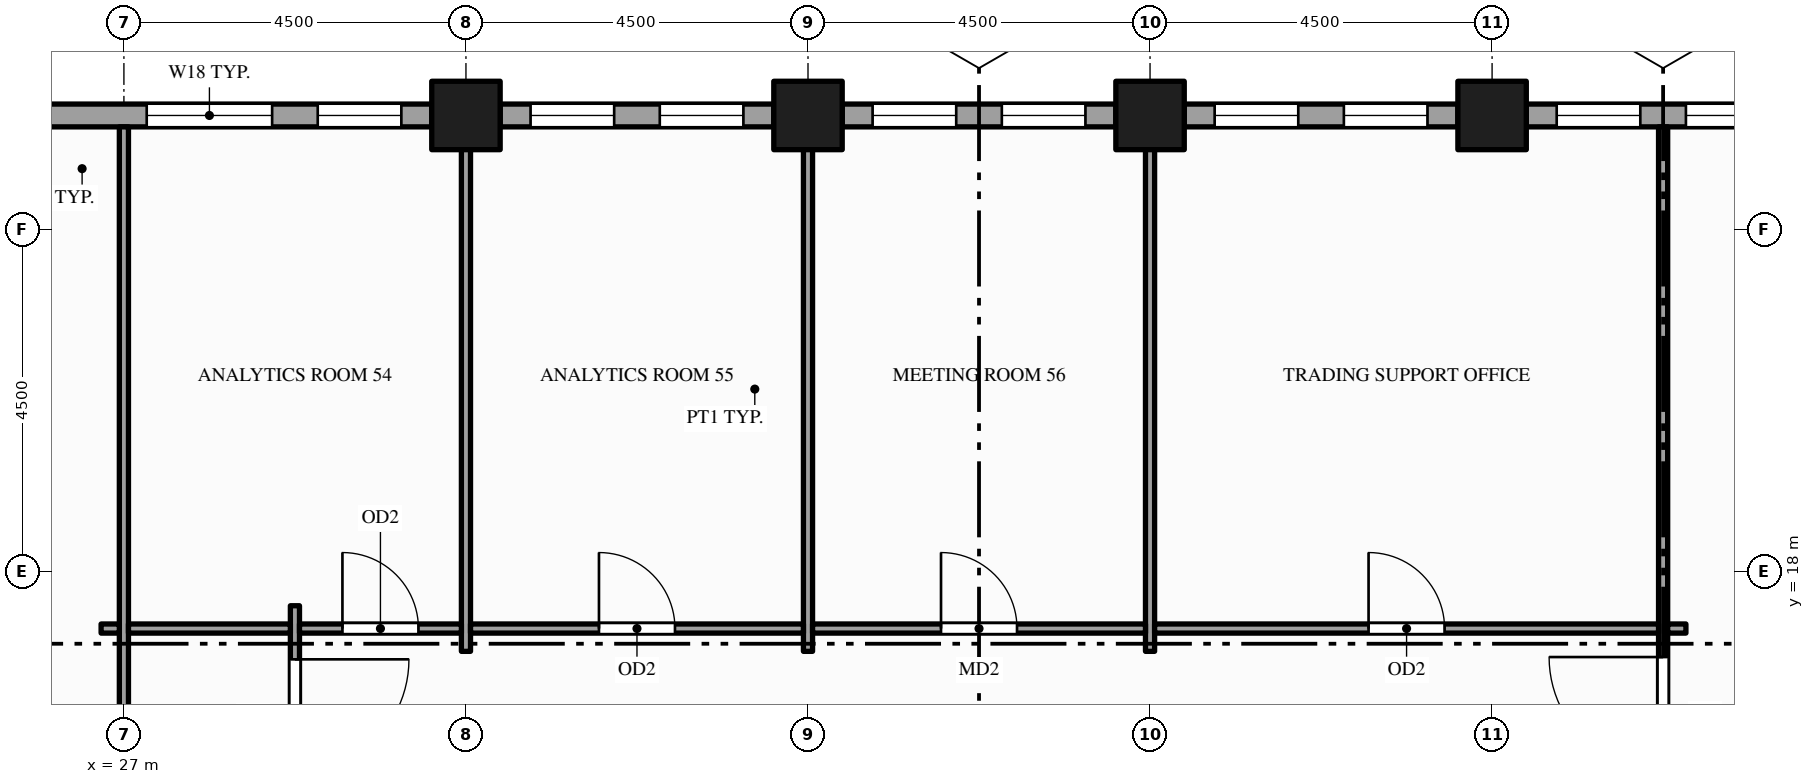
"""IFC4 building model, lengths in metres.
Left out: names, types, materials, properties, quantities, classifications, styles, units other than length and angle.
Written with IfcOpenShell. Run it as: python <this file> out.ifc"""

import sys

from ifc_helpers import new_model, si_unit, direction, frame, frame_2d, origin, origin_2d, place, context, subcontext, project, spatial, rectangle, hollow_rectangle, extrude, element, fill, save


model = new_model("IFC4")
c1 = context("Model", 3, precision=1e-05, world=origin(), true_north=direction((0.0, 1.0)))
c2 = subcontext(c1, "Body", "Model", "MODEL_VIEW")
j1 = project(units=[si_unit("LENGTHUNIT", "METRE"), si_unit("PLANEANGLEUNIT", "RADIAN")], contexts=[c1])
p1 = place(None, origin())
s1 = spatial("IfcSite", under=j1, at=p1, CompositionType="ELEMENT")
p2 = place(p1, origin())
s2 = spatial("IfcBuilding", under=s1, at=p2, CompositionType="ELEMENT")
p3 = place(p2, frame((0.0, 0.0, 171.0)))
s3 = spatial("IfcBuildingStorey", under=s2, at=p3, CompositionType="ELEMENT", Elevation=171.0)
for number, where, z_axis, x_axis in (
    (1, (31.5, 24.0, -0.15), (0.0, 0.0, 1.0), (1.0, 0.0, 0.0)),
    (2, (36.0, 24.0, -0.15), (0.0, 0.0, 1.0), (1.0, 0.0, 0.0)),
    (3, (40.5, 24.0, -0.15), (0.0, 0.0, 1.0), (1.0, 0.0, 0.0)),
    (4, (45.0, 24.0, -0.15), (0.0, 0.0, 1.0), (1.0, 0.0, 0.0)),
):
    element("IfcColumn", number, at=place(p3, frame(where, z_axis=z_axis, x_axis=x_axis)), inside=s3, PredefinedType="COLUMN", context=c2, shape_type="SweptSolid", body=[
        extrude(hollow_rectangle(XDim=0.9, YDim=0.9, WallThickness=0.045, at=origin_2d()), origin(), (0.0, 0.0, 1.0), 4.0),
    ])
p4 = place(p3, frame((49.05, 24.0, 0.0), z_axis=(0.0, 0.0, 1.0), x_axis=(-1.0, 0.0, 0.0)))
e5 = element("IfcWall", 5, at=p4, inside=s3, PredefinedType="STANDARD", context=c2, shape_type="SweptSolid", body=[
    extrude(rectangle(XDim=3.6, YDim=0.3, at=frame_2d((1.8, 0.0))), origin(), (0.0, 0.0, 1.0), 2.87),
])
p5 = place(p4, frame((0.4, 0.0, 0.9)))
e6 = element("IfcOpeningElement", 6, at=p5, cuts=e5, PredefinedType="OPENING", context=c2, shape_type="SweptSolid", body=[
    extrude(rectangle(XDim=1.1, YDim=1.75, at=frame_2d((0.55, 0.875))), frame((0.0, 0.16, 0.0), z_axis=(0.0, -1.0, 0.0), x_axis=(1.0, 0.0, 0.0)), (0.0, 0.0, 1.0), 0.32),
])
p6 = place(p4, frame((2.1, 0.0, 0.9)))
e7 = element("IfcOpeningElement", 7, at=p6, cuts=e5, PredefinedType="OPENING", context=c2, shape_type="SweptSolid", body=[
    extrude(rectangle(XDim=1.1, YDim=1.75, at=frame_2d((0.55, 0.875))), frame((0.0, 0.16, 0.0), z_axis=(0.0, -1.0, 0.0), x_axis=(1.0, 0.0, 0.0)), (0.0, 0.0, 1.0), 0.32),
])
p7 = place(p3, frame((44.55, 24.0, 0.0), z_axis=(0.0, 0.0, 1.0), x_axis=(-1.0, 0.0, 0.0)))
e8 = element("IfcWall", 8, at=p7, inside=s3, PredefinedType="STANDARD", context=c2, shape_type="SweptSolid", body=[
    extrude(rectangle(XDim=3.6, YDim=0.3, at=frame_2d((1.8, 0.0))), origin(), (0.0, 0.0, 1.0), 2.87),
])
p8 = place(p7, frame((0.4, 0.0, 0.9)))
e9 = element("IfcOpeningElement", 9, at=p8, cuts=e8, PredefinedType="OPENING", context=c2, shape_type="SweptSolid", body=[
    extrude(rectangle(XDim=1.1, YDim=1.75, at=frame_2d((0.55, 0.875))), frame((0.0, 0.16, 0.0), z_axis=(0.0, -1.0, 0.0), x_axis=(1.0, 0.0, 0.0)), (0.0, 0.0, 1.0), 0.32),
])
p9 = place(p7, frame((2.1, 0.0, 0.9)))
e10 = element("IfcOpeningElement", 10, at=p9, cuts=e8, PredefinedType="OPENING", context=c2, shape_type="SweptSolid", body=[
    extrude(rectangle(XDim=1.1, YDim=1.75, at=frame_2d((0.55, 0.875))), frame((0.0, 0.16, 0.0), z_axis=(0.0, -1.0, 0.0), x_axis=(1.0, 0.0, 0.0)), (0.0, 0.0, 1.0), 0.32),
])
p10 = place(p3, frame((40.05, 24.0, 0.0), z_axis=(0.0, 0.0, 1.0), x_axis=(-1.0, 0.0, 0.0)))
e11 = element("IfcWall", 11, at=p10, inside=s3, PredefinedType="STANDARD", context=c2, shape_type="SweptSolid", body=[
    extrude(rectangle(XDim=3.6, YDim=0.3, at=frame_2d((1.8, 0.0))), origin(), (0.0, 0.0, 1.0), 2.87),
])
p11 = place(p10, frame((0.4, 0.0, 0.9)))
e12 = element("IfcOpeningElement", 12, at=p11, cuts=e11, PredefinedType="OPENING", context=c2, shape_type="SweptSolid", body=[
    extrude(rectangle(XDim=1.1, YDim=1.75, at=frame_2d((0.55, 0.875))), frame((0.0, 0.16, 0.0), z_axis=(0.0, -1.0, 0.0), x_axis=(1.0, 0.0, 0.0)), (0.0, 0.0, 1.0), 0.32),
])
p12 = place(p10, frame((2.1, 0.0, 0.9)))
e13 = element("IfcOpeningElement", 13, at=p12, cuts=e11, PredefinedType="OPENING", context=c2, shape_type="SweptSolid", body=[
    extrude(rectangle(XDim=1.1, YDim=1.75, at=frame_2d((0.55, 0.875))), frame((0.0, 0.16, 0.0), z_axis=(0.0, -1.0, 0.0), x_axis=(1.0, 0.0, 0.0)), (0.0, 0.0, 1.0), 0.32),
])
p13 = place(p3, frame((35.55, 24.0, 0.0), z_axis=(0.0, 0.0, 1.0), x_axis=(-1.0, 0.0, 0.0)))
e14 = element("IfcWall", 14, at=p13, inside=s3, PredefinedType="STANDARD", context=c2, shape_type="SweptSolid", body=[
    extrude(rectangle(XDim=3.6, YDim=0.3, at=frame_2d((1.8, 0.0))), origin(), (0.0, 0.0, 1.0), 2.87),
])
p14 = place(p13, frame((0.4, 0.0, 0.9)))
e15 = element("IfcOpeningElement", 15, at=p14, cuts=e14, PredefinedType="OPENING", context=c2, shape_type="SweptSolid", body=[
    extrude(rectangle(XDim=1.1, YDim=1.75, at=frame_2d((0.55, 0.875))), frame((0.0, 0.16, 0.0), z_axis=(0.0, -1.0, 0.0), x_axis=(1.0, 0.0, 0.0)), (0.0, 0.0, 1.0), 0.32),
])
p15 = place(p13, frame((2.1, 0.0, 0.9)))
e16 = element("IfcOpeningElement", 16, at=p15, cuts=e14, PredefinedType="OPENING", context=c2, shape_type="SweptSolid", body=[
    extrude(rectangle(XDim=1.1, YDim=1.75, at=frame_2d((0.55, 0.875))), frame((0.0, 0.16, 0.0), z_axis=(0.0, -1.0, 0.0), x_axis=(1.0, 0.0, 0.0)), (0.0, 0.0, 1.0), 0.32),
])
p16 = place(p3, frame((31.05, 24.0, 0.0), z_axis=(0.0, 0.0, 1.0), x_axis=(-1.0, 0.0, 0.0)))
e17 = element("IfcWall", 17, at=p16, inside=s3, PredefinedType="STANDARD", context=c2, shape_type="SweptSolid", body=[
    extrude(rectangle(XDim=5.1, YDim=0.3, at=frame_2d((2.55, 0.0))), origin(), (0.0, 0.0, 1.0), 2.87),
])
p17 = place(p16, frame((0.4, 0.0, 0.9)))
e18 = element("IfcOpeningElement", 18, at=p17, cuts=e17, PredefinedType="OPENING", context=c2, shape_type="SweptSolid", body=[
    extrude(rectangle(XDim=1.1, YDim=1.75, at=frame_2d((0.55, 0.875))), frame((0.0, 0.16, 0.0), z_axis=(0.0, -1.0, 0.0), x_axis=(1.0, 0.0, 0.0)), (0.0, 0.0, 1.0), 0.32),
])
p18 = place(p16, frame((2.1, 0.0, 0.9)))
e19 = element("IfcOpeningElement", 19, at=p18, cuts=e17, PredefinedType="OPENING", context=c2, shape_type="SweptSolid", body=[
    extrude(rectangle(XDim=1.65, YDim=1.75, at=frame_2d((0.825, 0.875))), frame((0.0, 0.16, 0.0), z_axis=(0.0, -1.0, 0.0), x_axis=(1.0, 0.0, 0.0)), (0.0, 0.0, 1.0), 0.32),
])
p19 = place(p3, frame((27.0, 1.65, 0.0), z_axis=(0.0, 0.0, 1.0), x_axis=(0.0, 1.0, 0.0)))
e20 = element("IfcWall", 20, at=p19, inside=s3, PredefinedType="PARTITIONING", context=c2, shape_type="SweptSolid", body=[
    extrude(rectangle(XDim=22.2, YDim=0.12, at=frame_2d((11.1, 0.0))), origin(), (0.0, 0.0, 1.0), 2.87),
])
p20 = place(p19, frame((9.975, 0.0, 0.0)))
e21 = element("IfcOpeningElement", 21, at=p20, cuts=e20, PredefinedType="OPENING", context=c2, shape_type="SweptSolid", body=[
    extrude(rectangle(XDim=1.5, YDim=2.1, at=frame_2d((0.75, 1.05))), frame((0.0, 0.07, 0.0), z_axis=(0.0, -1.0, 0.0), x_axis=(1.0, 0.0, 0.0)), (0.0, 0.0, 1.0), 0.14),
])
p21 = place(p19, frame((13.125, 0.0, 0.0)))
e22 = element("IfcOpeningElement", 22, at=p21, cuts=e20, PredefinedType="OPENING", context=c2, shape_type="SweptSolid", body=[
    extrude(rectangle(XDim=1.2, YDim=2.1, at=frame_2d((0.6, 1.05))), frame((0.0, 0.07, 0.0), z_axis=(0.0, -1.0, 0.0), x_axis=(1.0, 0.0, 0.0)), (0.0, 0.0, 1.0), 0.14),
])
p22 = place(p3, frame((29.25, 7.95, 0.0), z_axis=(0.0, 0.0, 1.0), x_axis=(0.0, 1.0, 0.0)))
e23 = element("IfcWall", 23, at=p22, inside=s3, PredefinedType="PARTITIONING", context=c2, shape_type="SweptSolid", body=[
    extrude(rectangle(XDim=9.6, YDim=0.12, at=frame_2d((4.8, 0.0))), origin(), (0.0, 0.0, 1.0), 2.87),
])
p23 = place(p22, frame((0.705, 0.0, 0.0)))
e24 = element("IfcOpeningElement", 24, at=p23, cuts=e23, PredefinedType="OPENING", context=c2, shape_type="SweptSolid", body=[
    extrude(rectangle(XDim=1.5, YDim=2.1, at=frame_2d((0.75, 1.05))), frame((0.0, 0.07, 0.0), z_axis=(0.0, -1.0, 0.0), x_axis=(1.0, 0.0, 0.0)), (0.0, 0.0, 1.0), 0.14),
])
p24 = place(p22, frame((7.395, 0.0, 0.0)))
e25 = element("IfcOpeningElement", 25, at=p24, cuts=e23, PredefinedType="OPENING", context=c2, shape_type="SweptSolid", body=[
    extrude(rectangle(XDim=1.5, YDim=2.1, at=frame_2d((0.75, 1.05))), frame((0.0, 0.07, 0.0), z_axis=(0.0, -1.0, 0.0), x_axis=(1.0, 0.0, 0.0)), (0.0, 0.0, 1.0), 0.14),
])
for number, where, z_axis, x_axis in (
    (26, (31.5, 16.95, 0.0), (0.0, 0.0, 1.0), (0.0, 1.0, 0.0)),
    (27, (36.0, 16.95, 0.0), (0.0, 0.0, 1.0), (0.0, 1.0, 0.0)),
    (28, (40.5, 16.95, 0.0), (0.0, 0.0, 1.0), (0.0, 1.0, 0.0)),
):
    element("IfcWall", number, at=place(p3, frame(where, z_axis=z_axis, x_axis=x_axis)), inside=s3, PredefinedType="PARTITIONING", context=c2, shape_type="SweptSolid", body=[
        extrude(rectangle(XDim=6.9, YDim=0.12, at=frame_2d((3.45, 0.0))), origin(), (0.0, 0.0, 1.0), 2.87),
    ])
p25 = place(p3, frame((47.25, 1.65, 0.0), z_axis=(0.0, 0.0, 1.0), x_axis=(0.0, 1.0, 0.0)))
e29 = element("IfcWall", 29, at=p25, inside=s3, PredefinedType="PARTITIONING", context=c2, shape_type="SweptSolid", body=[
    extrude(rectangle(XDim=22.2, YDim=0.12, at=frame_2d((11.1, 0.0))), origin(), (0.0, 0.0, 1.0), 2.87),
])
p26 = place(p25, frame((6.975, 0.0, 0.0)))
e30 = element("IfcOpeningElement", 30, at=p26, cuts=e29, PredefinedType="OPENING", context=c2, shape_type="SweptSolid", body=[
    extrude(rectangle(XDim=1.5, YDim=2.1, at=frame_2d((0.75, 1.05))), frame((0.0, 0.07, 0.0), z_axis=(0.0, -1.0, 0.0), x_axis=(1.0, 0.0, 0.0)), (0.0, 0.0, 1.0), 0.14),
])
p27 = place(p25, frame((13.725, 0.0, 0.0)))
e31 = element("IfcOpeningElement", 31, at=p27, cuts=e29, PredefinedType="OPENING", context=c2, shape_type="SweptSolid", body=[
    extrude(rectangle(XDim=1.5, YDim=2.1, at=frame_2d((0.75, 1.05))), frame((0.0, 0.07, 0.0), z_axis=(0.0, -1.0, 0.0), x_axis=(1.0, 0.0, 0.0)), (0.0, 0.0, 1.0), 0.14),
])
p28 = place(p25, frame((9.29, 0.0, 0.0)))
e32 = element("IfcOpeningElement", 32, at=p28, cuts=e29, PredefinedType="OPENING", context=c2, shape_type="SweptSolid", body=[
    extrude(rectangle(XDim=0.9, YDim=2.1, at=frame_2d((0.45, 1.05))), frame((0.0, 0.07, 0.0), z_axis=(0.0, -1.0, 0.0), x_axis=(1.0, 0.0, 0.0)), (0.0, 0.0, 1.0), 0.14),
])
p29 = place(p25, frame((10.65, 0.0, 0.0)))
e33 = element("IfcOpeningElement", 33, at=p29, cuts=e29, PredefinedType="OPENING", context=c2, shape_type="SweptSolid", body=[
    extrude(rectangle(XDim=0.9, YDim=2.1, at=frame_2d((0.45, 1.05))), frame((0.0, 0.07, 0.0), z_axis=(0.0, -1.0, 0.0), x_axis=(1.0, 0.0, 0.0)), (0.0, 0.0, 1.0), 0.14),
])
p30 = place(p25, frame((12.01, 0.0, 0.0)))
e34 = element("IfcOpeningElement", 34, at=p30, cuts=e29, PredefinedType="OPENING", context=c2, shape_type="SweptSolid", body=[
    extrude(rectangle(XDim=1.0, YDim=2.1, at=frame_2d((0.5, 1.05))), frame((0.0, 0.07, 0.0), z_axis=(0.0, -1.0, 0.0), x_axis=(1.0, 0.0, 0.0)), (0.0, 0.0, 1.0), 0.14),
])
p31 = place(p3, frame((26.7, 17.25, 0.0), z_axis=(0.0, 0.0, 1.0), x_axis=(1.0, 0.0, 0.0)))
e35 = element("IfcWall", 35, at=p31, inside=s3, PredefinedType="PARTITIONING", context=c2, shape_type="SweptSolid", body=[
    extrude(rectangle(XDim=0.24, YDim=0.12, at=frame_2d((0.12, 0.0))), origin(), (0.0, 0.0, 1.0), 2.87),
])
p32 = place(p3, frame((27.06, 17.25, 0.0), z_axis=(0.0, 0.0, 1.0), x_axis=(1.0, 0.0, 0.0)))
e36 = element("IfcWall", 36, at=p32, inside=s3, PredefinedType="PARTITIONING", context=c2, shape_type="SweptSolid", body=[
    extrude(rectangle(XDim=2.13, YDim=0.12, at=frame_2d((1.065, 0.0))), origin(), (0.0, 0.0, 1.0), 2.87),
])
p33 = place(p3, frame((29.31, 17.25, 0.0), z_axis=(0.0, 0.0, 1.0), x_axis=(1.0, 0.0, 0.0)))
e37 = element("IfcWall", 37, at=p33, inside=s3, PredefinedType="PARTITIONING", context=c2, shape_type="SweptSolid", body=[
    extrude(rectangle(XDim=2.13, YDim=0.12, at=frame_2d((1.065, 0.0))), origin(), (0.0, 0.0, 1.0), 2.87),
])
p34 = place(p33, frame((0.565, 0.0, 0.0)))
e38 = element("IfcOpeningElement", 38, at=p34, cuts=e37, PredefinedType="OPENING", context=c2, shape_type="SweptSolid", body=[
    extrude(rectangle(XDim=1.0, YDim=2.1, at=frame_2d((0.5, 1.05))), frame((0.0, 0.07, 0.0), z_axis=(0.0, -1.0, 0.0), x_axis=(1.0, 0.0, 0.0)), (0.0, 0.0, 1.0), 0.14),
])
p35 = place(p3, frame((31.56, 17.25, 0.0), z_axis=(0.0, 0.0, 1.0), x_axis=(1.0, 0.0, 0.0)))
e39 = element("IfcWall", 39, at=p35, inside=s3, PredefinedType="PARTITIONING", context=c2, shape_type="SweptSolid", body=[
    extrude(rectangle(XDim=4.38, YDim=0.12, at=frame_2d((2.19, 0.0))), origin(), (0.0, 0.0, 1.0), 2.87),
])
p36 = place(p35, frame((1.69, 0.0, 0.0)))
e40 = element("IfcOpeningElement", 40, at=p36, cuts=e39, PredefinedType="OPENING", context=c2, shape_type="SweptSolid", body=[
    extrude(rectangle(XDim=1.0, YDim=2.1, at=frame_2d((0.5, 1.05))), frame((0.0, 0.07, 0.0), z_axis=(0.0, -1.0, 0.0), x_axis=(1.0, 0.0, 0.0)), (0.0, 0.0, 1.0), 0.14),
])
p37 = place(p3, frame((36.06, 17.25, 0.0), z_axis=(0.0, 0.0, 1.0), x_axis=(1.0, 0.0, 0.0)))
e41 = element("IfcWall", 41, at=p37, inside=s3, PredefinedType="PARTITIONING", context=c2, shape_type="SweptSolid", body=[
    extrude(rectangle(XDim=4.38, YDim=0.12, at=frame_2d((2.19, 0.0))), origin(), (0.0, 0.0, 1.0), 2.87),
])
p38 = place(p37, frame((1.69, 0.0, 0.0)))
e42 = element("IfcOpeningElement", 42, at=p38, cuts=e41, PredefinedType="OPENING", context=c2, shape_type="SweptSolid", body=[
    extrude(rectangle(XDim=1.0, YDim=2.1, at=frame_2d((0.5, 1.05))), frame((0.0, 0.07, 0.0), z_axis=(0.0, -1.0, 0.0), x_axis=(1.0, 0.0, 0.0)), (0.0, 0.0, 1.0), 0.14),
])
p39 = place(p3, frame((40.56, 17.25, 0.0), z_axis=(0.0, 0.0, 1.0), x_axis=(1.0, 0.0, 0.0)))
e43 = element("IfcWall", 43, at=p39, inside=s3, PredefinedType="PARTITIONING", context=c2, shape_type="SweptSolid", body=[
    extrude(rectangle(XDim=6.63, YDim=0.12, at=frame_2d((3.315, 0.0))), origin(), (0.0, 0.0, 1.0), 2.87),
])
p40 = place(p39, frame((2.815, 0.0, 0.0)))
e44 = element("IfcOpeningElement", 44, at=p40, cuts=e43, PredefinedType="OPENING", context=c2, shape_type="SweptSolid", body=[
    extrude(rectangle(XDim=1.0, YDim=2.1, at=frame_2d((0.5, 1.05))), frame((0.0, 0.07, 0.0), z_axis=(0.0, -1.0, 0.0), x_axis=(1.0, 0.0, 0.0)), (0.0, 0.0, 1.0), 0.14),
])
p41 = place(p3, frame((47.31, 17.25, 0.0), z_axis=(0.0, 0.0, 1.0), x_axis=(1.0, 0.0, 0.0)))
e45 = element("IfcWall", 45, at=p41, inside=s3, PredefinedType="PARTITIONING", context=c2, shape_type="SweptSolid", body=[
    extrude(rectangle(XDim=0.24, YDim=0.12, at=frame_2d((0.12, 0.0))), origin(), (0.0, 0.0, 1.0), 2.87),
])
p42 = place(p5, origin())
e46 = element("IfcWindow", 46, at=p42, inside=s3, PartitioningType="SINGLE_PANEL", PredefinedType="WINDOW", context=c2, shape_type="SweptSolid", body=[
    extrude(rectangle(XDim=1.1, YDim=1.75, at=frame_2d((0.55, 0.875))), frame((0.0, 0.03, 0.0), z_axis=(0.0, -1.0, 0.0), x_axis=(1.0, 0.0, 0.0)), (0.0, 0.0, 1.0), 0.06),
])
fill(e6, e46)
p43 = place(p6, origin())
e47 = element("IfcWindow", 47, at=p43, inside=s3, PartitioningType="SINGLE_PANEL", PredefinedType="WINDOW", context=c2, shape_type="SweptSolid", body=[
    extrude(rectangle(XDim=1.1, YDim=1.75, at=frame_2d((0.55, 0.875))), frame((0.0, 0.03, 0.0), z_axis=(0.0, -1.0, 0.0), x_axis=(1.0, 0.0, 0.0)), (0.0, 0.0, 1.0), 0.06),
])
fill(e7, e47)
p44 = place(p8, origin())
e48 = element("IfcWindow", 48, at=p44, inside=s3, PartitioningType="SINGLE_PANEL", PredefinedType="WINDOW", context=c2, shape_type="SweptSolid", body=[
    extrude(rectangle(XDim=1.1, YDim=1.75, at=frame_2d((0.55, 0.875))), frame((0.0, 0.03, 0.0), z_axis=(0.0, -1.0, 0.0), x_axis=(1.0, 0.0, 0.0)), (0.0, 0.0, 1.0), 0.06),
])
fill(e9, e48)
p45 = place(p9, origin())
e49 = element("IfcWindow", 49, at=p45, inside=s3, PartitioningType="SINGLE_PANEL", PredefinedType="WINDOW", context=c2, shape_type="SweptSolid", body=[
    extrude(rectangle(XDim=1.1, YDim=1.75, at=frame_2d((0.55, 0.875))), frame((0.0, 0.03, 0.0), z_axis=(0.0, -1.0, 0.0), x_axis=(1.0, 0.0, 0.0)), (0.0, 0.0, 1.0), 0.06),
])
fill(e10, e49)
p46 = place(p11, origin())
e50 = element("IfcWindow", 50, at=p46, inside=s3, PartitioningType="SINGLE_PANEL", PredefinedType="WINDOW", context=c2, shape_type="SweptSolid", body=[
    extrude(rectangle(XDim=1.1, YDim=1.75, at=frame_2d((0.55, 0.875))), frame((0.0, 0.03, 0.0), z_axis=(0.0, -1.0, 0.0), x_axis=(1.0, 0.0, 0.0)), (0.0, 0.0, 1.0), 0.06),
])
fill(e12, e50)
p47 = place(p12, origin())
e51 = element("IfcWindow", 51, at=p47, inside=s3, PartitioningType="SINGLE_PANEL", PredefinedType="WINDOW", context=c2, shape_type="SweptSolid", body=[
    extrude(rectangle(XDim=1.1, YDim=1.75, at=frame_2d((0.55, 0.875))), frame((0.0, 0.03, 0.0), z_axis=(0.0, -1.0, 0.0), x_axis=(1.0, 0.0, 0.0)), (0.0, 0.0, 1.0), 0.06),
])
fill(e13, e51)
p48 = place(p14, origin())
e52 = element("IfcWindow", 52, at=p48, inside=s3, PartitioningType="SINGLE_PANEL", PredefinedType="WINDOW", context=c2, shape_type="SweptSolid", body=[
    extrude(rectangle(XDim=1.1, YDim=1.75, at=frame_2d((0.55, 0.875))), frame((0.0, 0.03, 0.0), z_axis=(0.0, -1.0, 0.0), x_axis=(1.0, 0.0, 0.0)), (0.0, 0.0, 1.0), 0.06),
])
fill(e15, e52)
p49 = place(p15, origin())
e53 = element("IfcWindow", 53, at=p49, inside=s3, PartitioningType="SINGLE_PANEL", PredefinedType="WINDOW", context=c2, shape_type="SweptSolid", body=[
    extrude(rectangle(XDim=1.1, YDim=1.75, at=frame_2d((0.55, 0.875))), frame((0.0, 0.03, 0.0), z_axis=(0.0, -1.0, 0.0), x_axis=(1.0, 0.0, 0.0)), (0.0, 0.0, 1.0), 0.06),
])
fill(e16, e53)
p50 = place(p17, origin())
e54 = element("IfcWindow", 54, at=p50, inside=s3, PartitioningType="SINGLE_PANEL", PredefinedType="WINDOW", context=c2, shape_type="SweptSolid", body=[
    extrude(rectangle(XDim=1.1, YDim=1.75, at=frame_2d((0.55, 0.875))), frame((0.0, 0.03, 0.0), z_axis=(0.0, -1.0, 0.0), x_axis=(1.0, 0.0, 0.0)), (0.0, 0.0, 1.0), 0.06),
])
fill(e18, e54)
p51 = place(p18, origin())
e55 = element("IfcWindow", 55, at=p51, inside=s3, PartitioningType="SINGLE_PANEL", PredefinedType="WINDOW", context=c2, shape_type="SweptSolid", body=[
    extrude(rectangle(XDim=1.65, YDim=1.75, at=frame_2d((0.825, 0.875))), frame((0.0, 0.03, 0.0), z_axis=(0.0, -1.0, 0.0), x_axis=(1.0, 0.0, 0.0)), (0.0, 0.0, 1.0), 0.06),
])
fill(e19, e55)
p52 = place(p24, origin())
e56 = element("IfcDoor", 56, at=p52, inside=s3, OperationType="SINGLE_SWING_RIGHT", PredefinedType="DOOR", context=c2, shape_type="SweptSolid", body=[
    extrude(rectangle(XDim=1.5, YDim=2.1, at=frame_2d((0.75, 1.05))), frame((0.0, 0.025, 0.0), z_axis=(0.0, -1.0, 0.0), x_axis=(1.0, 0.0, 0.0)), (0.0, 0.0, 1.0), 0.05),
])
fill(e25, e56)
p53 = place(p27, origin())
e57 = element("IfcDoor", 57, at=p53, inside=s3, OperationType="SINGLE_SWING_RIGHT", PredefinedType="DOOR", context=c2, shape_type="SweptSolid", body=[
    extrude(rectangle(XDim=1.5, YDim=2.1, at=frame_2d((0.75, 1.05))), frame((0.0, 0.025, 0.0), z_axis=(0.0, -1.0, 0.0), x_axis=(1.0, 0.0, 0.0)), (0.0, 0.0, 1.0), 0.05),
])
fill(e31, e57)
p54 = place(p34, origin())
e58 = element("IfcDoor", 58, at=p54, inside=s3, OperationType="SINGLE_SWING_LEFT", PredefinedType="DOOR", context=c2, shape_type="SweptSolid", body=[
    extrude(rectangle(XDim=1.0, YDim=2.1, at=frame_2d((0.5, 1.05))), frame((0.0, 0.025, 0.0), z_axis=(0.0, -1.0, 0.0), x_axis=(1.0, 0.0, 0.0)), (0.0, 0.0, 1.0), 0.05),
])
fill(e38, e58)
p55 = place(p36, origin())
e59 = element("IfcDoor", 59, at=p55, inside=s3, OperationType="SINGLE_SWING_LEFT", PredefinedType="DOOR", context=c2, shape_type="SweptSolid", body=[
    extrude(rectangle(XDim=1.0, YDim=2.1, at=frame_2d((0.5, 1.05))), frame((0.0, 0.025, 0.0), z_axis=(0.0, -1.0, 0.0), x_axis=(1.0, 0.0, 0.0)), (0.0, 0.0, 1.0), 0.05),
])
fill(e40, e59)
p56 = place(p38, origin())
e60 = element("IfcDoor", 60, at=p56, inside=s3, OperationType="SINGLE_SWING_LEFT", PredefinedType="DOOR", context=c2, shape_type="SweptSolid", body=[
    extrude(rectangle(XDim=1.0, YDim=2.1, at=frame_2d((0.5, 1.05))), frame((0.0, 0.025, 0.0), z_axis=(0.0, -1.0, 0.0), x_axis=(1.0, 0.0, 0.0)), (0.0, 0.0, 1.0), 0.05),
])
fill(e42, e60)
p57 = place(p40, origin())
e61 = element("IfcDoor", 61, at=p57, inside=s3, OperationType="SINGLE_SWING_LEFT", PredefinedType="DOOR", context=c2, shape_type="SweptSolid", body=[
    extrude(rectangle(XDim=1.0, YDim=2.1, at=frame_2d((0.5, 1.05))), frame((0.0, 0.025, 0.0), z_axis=(0.0, -1.0, 0.0), x_axis=(1.0, 0.0, 0.0)), (0.0, 0.0, 1.0), 0.05),
])
fill(e44, e61)
save(model, sys.argv[1])
